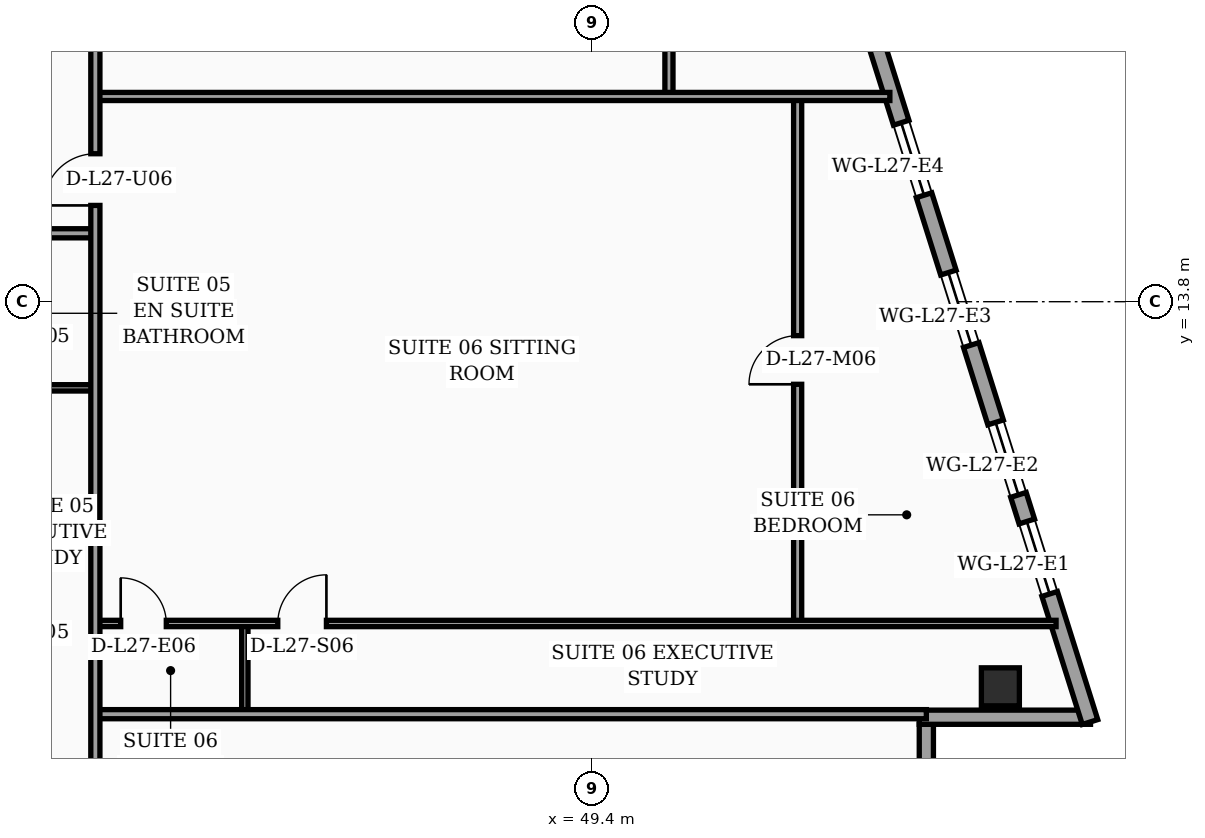
"""IFC4 building model, lengths in metres.
Left out: names, types, materials, properties, quantities, classifications, styles, units other than length and angle.
Written with IfcOpenShell. Run it as: python <this file> out.ifc"""

import sys

from ifc_helpers import new_model, si_unit, direction, frame, frame_2d, origin, origin_2d, place, context, subcontext, project, spatial, rectangle, hollow_rectangle, extrude, element, fill, save


model = new_model("IFC4")
c1 = context("Model", 3, precision=1e-05, world=origin(), true_north=direction((0.0, 1.0)))
c2 = subcontext(c1, "Body", "Model", "MODEL_VIEW")
j1 = project(units=[si_unit("LENGTHUNIT", "METRE"), si_unit("PLANEANGLEUNIT", "RADIAN")], contexts=[c1])
p1 = place(None, origin())
s1 = spatial("IfcSite", under=j1, at=p1, CompositionType="ELEMENT")
p2 = place(p1, origin())
s2 = spatial("IfcBuilding", under=s1, at=p2, CompositionType="ELEMENT")
p3 = place(p2, frame((0.0, 0.0, 112.6)))
s3 = spatial("IfcBuildingStorey", under=s2, at=p3, CompositionType="ELEMENT", Elevation=112.6)
p4 = place(p3, frame((57.461, 6.2, 0.0), z_axis=(0.0, 0.0, 1.0), x_axis=(1.0, 0.0, 0.0)))
e1 = element("IfcColumn", 1, at=p4, inside=s3, PredefinedType="COLUMN", context=c2, shape_type="SweptSolid", body=[
    extrude(hollow_rectangle(XDim=0.75, YDim=0.75, WallThickness=0.032, at=origin_2d()), origin(), (0.0, 0.0, 1.0), 3.56),
])
p5 = place(p3, frame((56.0, 2.52, 0.0), z_axis=(0.0, 0.0, 1.0), x_axis=(0.0, 1.0, 0.0)))
e2 = element("IfcWall", 2, at=p5, inside=s3, PredefinedType="SOLIDWALL", context=c2, shape_type="SweptSolid", body=[
    extrude(rectangle(XDim=2.94, YDim=0.28, at=frame_2d((1.47, 0.0))), origin(), (0.0, 0.0, 1.0), 3.04),
])
p6 = place(p3, frame((55.86, 5.6, 0.0), z_axis=(0.0, 0.0, 1.0), x_axis=(1.0, 0.0, 0.0)))
e3 = element("IfcWall", 3, at=p6, inside=s3, PredefinedType="SOLIDWALL", context=c2, shape_type="SweptSolid", body=[
    extrude(rectangle(XDim=3.38, YDim=0.28, at=frame_2d((1.69, 0.0))), origin(), (0.0, 0.0, 1.0), 3.04),
])
p7 = place(p3, frame((59.23, 5.505, 0.0), z_axis=(0.0, 0.0, 1.0), x_axis=(-0.300509063924, 0.953778958931, 0.0)))
e4 = element("IfcWall", 4, at=p7, inside=s3, PredefinedType="SOLIDWALL", context=c2, shape_type="SweptSolid", body=[
    extrude(rectangle(XDim=30.814, YDim=0.32, at=frame_2d((15.407, 0.0))), origin(), (0.0, 0.0, 1.0), 3.56),
])
p8 = place(p7, frame((18.796, 0.0, 0.0)))
e5 = element("IfcOpeningElement", 5, at=p8, cuts=e4, PredefinedType="OPENING", context=c2, shape_type="SweptSolid", body=[
    extrude(rectangle(XDim=1.4, YDim=2.25, at=frame_2d((0.7, 1.125))), frame((0.0, 0.17, 0.0), z_axis=(0.0, -1.0, 0.0), x_axis=(1.0, 0.0, 0.0)), (0.0, 0.0, 1.0), 0.34),
])
p9 = place(p7, frame((2.65, 0.0, 0.75)))
e6 = element("IfcOpeningElement", 6, at=p9, cuts=e4, PredefinedType="OPENING", context=c2, shape_type="SweptSolid", body=[
    extrude(rectangle(XDim=1.5, YDim=1.6, at=frame_2d((0.75, 0.8))), frame((0.0, 0.17, 0.0), z_axis=(0.0, -1.0, 0.0), x_axis=(1.0, 0.0, 0.0)), (0.0, 0.0, 1.0), 0.34),
])
p10 = place(p7, frame((4.7, 0.0, 0.75)))
e7 = element("IfcOpeningElement", 7, at=p10, cuts=e4, PredefinedType="OPENING", context=c2, shape_type="SweptSolid", body=[
    extrude(rectangle(XDim=1.5, YDim=1.6, at=frame_2d((0.75, 0.8))), frame((0.0, 0.17, 0.0), z_axis=(0.0, -1.0, 0.0), x_axis=(1.0, 0.0, 0.0)), (0.0, 0.0, 1.0), 0.34),
])
p11 = place(p7, frame((7.8, 0.0, 0.75)))
e8 = element("IfcOpeningElement", 8, at=p11, cuts=e4, PredefinedType="OPENING", context=c2, shape_type="SweptSolid", body=[
    extrude(rectangle(XDim=1.5, YDim=1.6, at=frame_2d((0.75, 0.8))), frame((0.0, 0.17, 0.0), z_axis=(0.0, -1.0, 0.0), x_axis=(1.0, 0.0, 0.0)), (0.0, 0.0, 1.0), 0.34),
])
p12 = place(p7, frame((10.9, 0.0, 0.75)))
e9 = element("IfcOpeningElement", 9, at=p12, cuts=e4, PredefinedType="OPENING", context=c2, shape_type="SweptSolid", body=[
    extrude(rectangle(XDim=1.5, YDim=1.6, at=frame_2d((0.75, 0.8))), frame((0.0, 0.17, 0.0), z_axis=(0.0, -1.0, 0.0), x_axis=(1.0, 0.0, 0.0)), (0.0, 0.0, 1.0), 0.34),
])
p13 = place(p7, frame((14.0, 0.0, 0.75)))
e10 = element("IfcOpeningElement", 10, at=p13, cuts=e4, PredefinedType="OPENING", context=c2, shape_type="SweptSolid", body=[
    extrude(rectangle(XDim=1.5, YDim=1.6, at=frame_2d((0.75, 0.8))), frame((0.0, 0.17, 0.0), z_axis=(0.0, -1.0, 0.0), x_axis=(1.0, 0.0, 0.0)), (0.0, 0.0, 1.0), 0.34),
])
p14 = place(p7, frame((16.55, 0.0, 0.75)))
e11 = element("IfcOpeningElement", 11, at=p14, cuts=e4, PredefinedType="OPENING", context=c2, shape_type="SweptSolid", body=[
    extrude(rectangle(XDim=1.5, YDim=1.6, at=frame_2d((0.75, 0.8))), frame((0.0, 0.17, 0.0), z_axis=(0.0, -1.0, 0.0), x_axis=(1.0, 0.0, 0.0)), (0.0, 0.0, 1.0), 0.34),
])
p15 = place(p7, frame((23.3, 0.0, 0.75)))
e12 = element("IfcOpeningElement", 12, at=p15, cuts=e4, PredefinedType="OPENING", context=c2, shape_type="SweptSolid", body=[
    extrude(rectangle(XDim=1.5, YDim=1.6, at=frame_2d((0.75, 0.8))), frame((0.0, 0.17, 0.0), z_axis=(0.0, -1.0, 0.0), x_axis=(1.0, 0.0, 0.0)), (0.0, 0.0, 1.0), 0.34),
])
p16 = place(p7, frame((27.45, 0.0, 0.75)))
e13 = element("IfcOpeningElement", 13, at=p16, cuts=e4, PredefinedType="OPENING", context=c2, shape_type="SweptSolid", body=[
    extrude(rectangle(XDim=1.5, YDim=1.6, at=frame_2d((0.75, 0.8))), frame((0.0, 0.17, 0.0), z_axis=(0.0, -1.0, 0.0), x_axis=(1.0, 0.0, 0.0)), (0.0, 0.0, 1.0), 0.34),
])
p17 = place(p3, frame((37.6, 12.1, 0.0), z_axis=(0.0, 0.0, 1.0), x_axis=(1.0, 0.0, 0.0)))
e14 = element("IfcWall", 14, at=p17, inside=s3, PredefinedType="PARTITIONING", context=c2, shape_type="SweptSolid", body=[
    extrude(rectangle(XDim=2.0, YDim=0.125, at=frame_2d((1.0, 0.0))), origin(), (0.0, 0.0, 1.0), 3.56),
])
p18 = place(p3, frame((32.4, 15.15, 0.0), z_axis=(0.0, 0.0, 1.0), x_axis=(1.0, 0.0, 0.0)))
e15 = element("IfcWall", 15, at=p18, inside=s3, PredefinedType="PARTITIONING", context=c2, shape_type="SweptSolid", body=[
    extrude(rectangle(XDim=7.2, YDim=0.18, at=frame_2d((3.6, 0.0))), origin(), (0.0, 0.0, 1.0), 2.84),
])
p19 = place(p18, frame((2.19, 0.0, 0.0)))
e16 = element("IfcOpeningElement", 16, at=p19, cuts=e15, PredefinedType="OPENING", context=c2, shape_type="SweptSolid", body=[
    extrude(rectangle(XDim=1.02, YDim=2.2, at=frame_2d((0.51, 1.1))), frame((0.0, 0.1, 0.0), z_axis=(0.0, -1.0, 0.0), x_axis=(1.0, 0.0, 0.0)), (0.0, 0.0, 1.0), 0.2),
])
p20 = place(p3, frame((42.55, 5.66, 0.0), z_axis=(0.0, 0.0, 1.0), x_axis=(0.0, 1.0, 0.0)))
e17 = element("IfcWall", 17, at=p20, inside=s3, PredefinedType="PARTITIONING", context=c2, shape_type="SweptSolid", body=[
    extrude(rectangle(XDim=1.79, YDim=0.125, at=frame_2d((0.895, 0.0))), origin(), (0.0, 0.0, 1.0), 3.56),
])
p21 = place(p3, frame((53.46, 7.45, 0.0), z_axis=(0.0, 0.0, 1.0), x_axis=(0.0, 1.0, 0.0)))
e18 = element("IfcWall", 18, at=p21, inside=s3, PredefinedType="PARTITIONING", context=c2, shape_type="SweptSolid", body=[
    extrude(rectangle(XDim=10.4, YDim=0.16, at=frame_2d((5.2, 0.0))), origin(), (0.0, 0.0, 1.0), 3.04),
])
p22 = place(p21, frame((4.72, 0.0, 0.0)))
e19 = element("IfcOpeningElement", 19, at=p22, cuts=e18, PredefinedType="OPENING", context=c2, shape_type="SweptSolid", body=[
    extrude(rectangle(XDim=0.96, YDim=2.2, at=frame_2d((0.48, 1.1))), frame((0.0, 0.09, 0.0), z_axis=(0.0, -1.0, 0.0), x_axis=(1.0, 0.0, 0.0)), (0.0, 0.0, 1.0), 0.18),
])
p23 = place(p3, frame((39.6, 7.45, 0.0), z_axis=(0.0, 0.0, 1.0), x_axis=(1.0, 0.0, 0.0)))
e20 = element("IfcWall", 20, at=p23, inside=s3, PredefinedType="PARTITIONING", context=c2, shape_type="SweptSolid", body=[
    extrude(rectangle(XDim=18.96, YDim=0.125, at=frame_2d((9.48, 0.0))), origin(), (0.0, 0.0, 1.0), 2.84),
])
p24 = place(p23, frame((0.5, 0.0, 0.0)))
e21 = element("IfcOpeningElement", 21, at=p24, cuts=e20, PredefinedType="OPENING", context=c2, shape_type="SweptSolid", body=[
    extrude(rectangle(XDim=0.9, YDim=2.15, at=frame_2d((0.45, 1.075))), frame((0.0, 0.073, 0.0), z_axis=(0.0, -1.0, 0.0), x_axis=(1.0, 0.0, 0.0)), (0.0, 0.0, 1.0), 0.145),
])
p25 = place(p23, frame((3.6, 0.0, 0.0)))
e22 = element("IfcOpeningElement", 22, at=p25, cuts=e20, PredefinedType="OPENING", context=c2, shape_type="SweptSolid", body=[
    extrude(rectangle(XDim=0.96, YDim=2.2, at=frame_2d((0.48, 1.1))), frame((0.0, 0.073, 0.0), z_axis=(0.0, -1.0, 0.0), x_axis=(1.0, 0.0, 0.0)), (0.0, 0.0, 1.0), 0.145),
])
p26 = place(p3, frame((39.6, 5.66, 0.0), z_axis=(0.0, 0.0, 1.0), x_axis=(1.0, 0.0, 0.0)))
e23 = element("IfcWall", 23, at=p26, inside=s3, PredefinedType="PARTITIONING", context=c2, shape_type="SweptSolid", body=[
    extrude(rectangle(XDim=16.4, YDim=0.18, at=frame_2d((8.2, 0.0))), origin(), (0.0, 0.0, 1.0), 2.84),
])
p27 = place(p3, frame((50.92, 17.85, 0.0), z_axis=(0.0, 0.0, 1.0), x_axis=(0.0, 1.0, 0.0)))
e24 = element("IfcWall", 24, at=p27, inside=s3, PredefinedType="PARTITIONING", context=c2, shape_type="SweptSolid", body=[
    extrude(rectangle(XDim=5.74, YDim=0.16, at=frame_2d((2.87, 0.0))), origin(), (0.0, 0.0, 1.0), 2.84),
])
p28 = place(p27, frame((2.39, 0.0, 0.0)))
e25 = element("IfcOpeningElement", 25, at=p28, cuts=e24, PredefinedType="OPENING", context=c2, shape_type="SweptSolid", body=[
    extrude(rectangle(XDim=0.96, YDim=2.2, at=frame_2d((0.48, 1.1))), frame((0.0, 0.09, 0.0), z_axis=(0.0, -1.0, 0.0), x_axis=(1.0, 0.0, 0.0)), (0.0, 0.0, 1.0), 0.18),
])
p29 = place(p3, frame((39.6, 17.85, 0.0), z_axis=(0.0, 0.0, 1.0), x_axis=(1.0, 0.0, 0.0)))
e26 = element("IfcWall", 26, at=p29, inside=s3, PredefinedType="PARTITIONING", context=c2, shape_type="SweptSolid", body=[
    extrude(rectangle(XDim=15.68, YDim=0.16, at=frame_2d((7.84, 0.0))), origin(), (0.0, 0.0, 1.0), 2.84),
])
p30 = place(p3, frame((39.6, 2.44, 0.0), z_axis=(0.0, 0.0, 1.0), x_axis=(0.0, 1.0, 0.0)))
e27 = element("IfcWall", 27, at=p30, inside=s3, PredefinedType="PARTITIONING", context=c2, shape_type="SweptSolid", body=[
    extrude(rectangle(XDim=31.04, YDim=0.18, at=frame_2d((15.52, 0.0))), origin(), (0.0, 0.0, 1.0), 2.84),
])
p31 = place(p30, frame((13.26, 0.0, 0.0)))
e28 = element("IfcOpeningElement", 28, at=p31, cuts=e27, PredefinedType="OPENING", context=c2, shape_type="SweptSolid", body=[
    extrude(rectangle(XDim=1.02, YDim=2.2, at=frame_2d((0.51, 1.1))), frame((0.0, 0.1, 0.0), z_axis=(0.0, -1.0, 0.0), x_axis=(1.0, 0.0, 0.0)), (0.0, 0.0, 1.0), 0.2),
])
p32 = place(p30, frame((17.77, 0.0, 0.0)))
e29 = element("IfcOpeningElement", 29, at=p32, cuts=e27, PredefinedType="OPENING", context=c2, shape_type="SweptSolid", body=[
    extrude(rectangle(XDim=1.02, YDim=2.2, at=frame_2d((0.51, 1.1))), frame((0.0, 0.1, 0.0), z_axis=(0.0, -1.0, 0.0), x_axis=(1.0, 0.0, 0.0)), (0.0, 0.0, 1.0), 0.2),
])
p33 = place(p30, frame((25.58, 0.0, 0.0)))
e30 = element("IfcOpeningElement", 30, at=p33, cuts=e27, PredefinedType="OPENING", context=c2, shape_type="SweptSolid", body=[
    extrude(rectangle(XDim=1.02, YDim=2.2, at=frame_2d((0.51, 1.1))), frame((0.0, 0.1, 0.0), z_axis=(0.0, -1.0, 0.0), x_axis=(1.0, 0.0, 0.0)), (0.0, 0.0, 1.0), 0.2),
])
p34 = place(p9, origin())
e31 = element("IfcWindow", 31, at=p34, inside=s3, PartitioningType="SINGLE_PANEL", PredefinedType="WINDOW", context=c2, shape_type="SweptSolid", body=[
    extrude(rectangle(XDim=1.5, YDim=1.6, at=frame_2d((0.75, 0.8))), frame((0.0, 0.03, 0.0), z_axis=(0.0, -1.0, 0.0), x_axis=(1.0, 0.0, 0.0)), (0.0, 0.0, 1.0), 0.06),
])
fill(e6, e31)
p35 = place(p10, origin())
e32 = element("IfcWindow", 32, at=p35, inside=s3, PartitioningType="SINGLE_PANEL", PredefinedType="WINDOW", context=c2, shape_type="SweptSolid", body=[
    extrude(rectangle(XDim=1.5, YDim=1.6, at=frame_2d((0.75, 0.8))), frame((0.0, 0.03, 0.0), z_axis=(0.0, -1.0, 0.0), x_axis=(1.0, 0.0, 0.0)), (0.0, 0.0, 1.0), 0.06),
])
fill(e7, e32)
p36 = place(p11, origin())
e33 = element("IfcWindow", 33, at=p36, inside=s3, PartitioningType="SINGLE_PANEL", PredefinedType="WINDOW", context=c2, shape_type="SweptSolid", body=[
    extrude(rectangle(XDim=1.5, YDim=1.6, at=frame_2d((0.75, 0.8))), frame((0.0, 0.03, 0.0), z_axis=(0.0, -1.0, 0.0), x_axis=(1.0, 0.0, 0.0)), (0.0, 0.0, 1.0), 0.06),
])
fill(e8, e33)
p37 = place(p12, origin())
e34 = element("IfcWindow", 34, at=p37, inside=s3, PartitioningType="SINGLE_PANEL", PredefinedType="WINDOW", context=c2, shape_type="SweptSolid", body=[
    extrude(rectangle(XDim=1.5, YDim=1.6, at=frame_2d((0.75, 0.8))), frame((0.0, 0.03, 0.0), z_axis=(0.0, -1.0, 0.0), x_axis=(1.0, 0.0, 0.0)), (0.0, 0.0, 1.0), 0.06),
])
fill(e9, e34)
p38 = place(p22, origin())
e35 = element("IfcDoor", 35, at=p38, inside=s3, OperationType="SINGLE_SWING_LEFT", PredefinedType="DOOR", context=c2, shape_type="SweptSolid", body=[
    extrude(rectangle(XDim=0.96, YDim=2.2, at=frame_2d((0.48, 1.1))), frame((0.0, 0.025, 0.0), z_axis=(0.0, -1.0, 0.0), x_axis=(1.0, 0.0, 0.0)), (0.0, 0.0, 1.0), 0.05),
])
fill(e19, e35)
p39 = place(p24, origin())
e36 = element("IfcDoor", 36, at=p39, inside=s3, OperationType="SINGLE_SWING_LEFT", PredefinedType="DOOR", context=c2, shape_type="SweptSolid", body=[
    extrude(rectangle(XDim=0.9, YDim=2.15, at=frame_2d((0.45, 1.075))), frame((0.0, 0.025, 0.0), z_axis=(0.0, -1.0, 0.0), x_axis=(1.0, 0.0, 0.0)), (0.0, 0.0, 1.0), 0.05),
])
fill(e21, e36)
p40 = place(p25, origin())
e37 = element("IfcDoor", 37, at=p40, inside=s3, OperationType="SINGLE_SWING_RIGHT", PredefinedType="DOOR", context=c2, shape_type="SweptSolid", body=[
    extrude(rectangle(XDim=0.96, YDim=2.2, at=frame_2d((0.48, 1.1))), frame((0.0, 0.025, 0.0), z_axis=(0.0, -1.0, 0.0), x_axis=(1.0, 0.0, 0.0)), (0.0, 0.0, 1.0), 0.05),
])
fill(e22, e37)
p41 = place(p31, origin())
e38 = element("IfcDoor", 38, at=p41, inside=s3, OperationType="SINGLE_SWING_LEFT", PredefinedType="DOOR", context=c2, shape_type="SweptSolid", body=[
    extrude(rectangle(XDim=1.02, YDim=2.2, at=frame_2d((0.51, 1.1))), frame((0.0, 0.025, 0.0), z_axis=(0.0, -1.0, 0.0), x_axis=(1.0, 0.0, 0.0)), (0.0, 0.0, 1.0), 0.05),
])
fill(e28, e38)
save(model, sys.argv[1])
